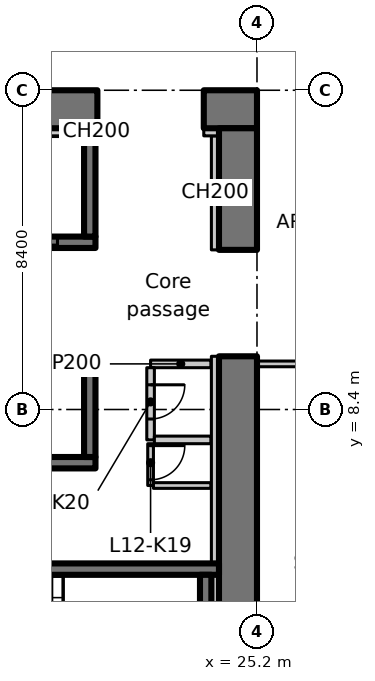
"""IFC4 building model, lengths in metres.
Left out: names, types, materials, properties, quantities, classifications, styles, units other than length and angle.
Written with IfcOpenShell. Run it as: python <this file> out.ifc"""

import sys

from ifc_helpers import new_model, si_unit, direction, frame, frame_2d, origin, place, context, subcontext, project, spatial, rectangle, extrude, element, fill, save


model = new_model("IFC4")
c1 = context("Model", 3, precision=1e-05, world=origin(), true_north=direction((0.0, 1.0)))
c2 = subcontext(c1, "Body", "Model", "MODEL_VIEW")
j1 = project(units=[si_unit("LENGTHUNIT", "METRE"), si_unit("PLANEANGLEUNIT", "RADIAN")], contexts=[c1])
p1 = place(None, origin())
s1 = spatial("IfcSite", under=j1, at=p1, CompositionType="ELEMENT")
p2 = place(p1, origin())
s2 = spatial("IfcBuilding", under=s1, at=p2, CompositionType="ELEMENT")
p3 = place(p2, frame((0.0, 0.0, 58.1)))
s3 = spatial("IfcBuildingStorey", under=s2, at=p3, CompositionType="ELEMENT", Elevation=58.1)
p4 = place(p3, frame((-1.1, 16.3, 0.0), z_axis=(0.0, 0.0, 1.0), x_axis=(1.0, 0.0, 0.0)))
e1 = element("IfcWall", 1, at=p4, inside=s3, PredefinedType="SHEAR", context=c2, shape_type="SweptSolid", body=[
    extrude(rectangle(XDim=22.1, YDim=1.0, at=frame_2d((11.05, 0.0))), origin(), (0.0, 0.0, 1.0), 3.35),
])
p5 = place(p4, frame((3.15, 0.0, 0.0)))
e2 = element("IfcOpeningElement", 2, at=p5, cuts=e1, PredefinedType="OPENING", context=c2, shape_type="SweptSolid", body=[
    extrude(rectangle(XDim=1.1, YDim=2.3, at=frame_2d((0.55, 1.15))), frame((0.0, 0.51, 0.0), z_axis=(0.0, -1.0, 0.0), x_axis=(1.0, 0.0, 0.0)), (0.0, 0.0, 1.0), 1.02),
])
p6 = place(p3, frame((23.8, 16.3, 0.0), z_axis=(0.0, 0.0, 1.0), x_axis=(1.0, 0.0, 0.0)))
e3 = element("IfcWall", 3, at=p6, inside=s3, PredefinedType="SHEAR", context=c2, shape_type="SweptSolid", body=[
    extrude(rectangle(XDim=1.4, YDim=1.0, at=frame_2d((0.7, 0.0))), origin(), (0.0, 0.0, 1.0), 3.35),
])
p7 = place(p3, frame((24.7, 1.0, 0.0), z_axis=(0.0, 0.0, 1.0), x_axis=(0.0, 1.0, 0.0)))
e4 = element("IfcWall", 4, at=p7, inside=s3, PredefinedType="SHEAR", context=c2, shape_type="SweptSolid", body=[
    extrude(rectangle(XDim=8.8, YDim=1.0, at=frame_2d((4.4, 0.0))), origin(), (0.0, 0.0, 1.0), 3.35),
])
p8 = place(p3, frame((24.7, 12.6, 0.0), z_axis=(0.0, 0.0, 1.0), x_axis=(0.0, 1.0, 0.0)))
e5 = element("IfcWall", 5, at=p8, inside=s3, PredefinedType="SHEAR", context=c2, shape_type="SweptSolid", body=[
    extrude(rectangle(XDim=3.2, YDim=1.0, at=frame_2d((1.6, 0.0))), origin(), (0.0, 0.0, 1.0), 3.35),
])
p9 = place(p3, frame((24.1, 12.6, 0.0), z_axis=(0.0, 0.0, 1.0), x_axis=(0.0, 1.0, 0.0)))
e6 = element("IfcWall", 6, at=p9, inside=s3, PredefinedType="PARTITIONING", context=c2, shape_type="SweptSolid", body=[
    extrude(rectangle(XDim=3.0, YDim=0.2, at=frame_2d((1.5, 0.0))), origin(), (0.0, 0.0, 1.0), 3.35),
])
p10 = place(p3, frame((23.8, 15.7, 0.0), z_axis=(0.0, 0.0, 1.0), x_axis=(1.0, 0.0, 0.0)))
e7 = element("IfcWall", 7, at=p10, inside=s3, PredefinedType="PARTITIONING", context=c2, shape_type="SweptSolid", body=[
    extrude(rectangle(XDim=0.4, YDim=0.2, at=frame_2d((0.2, 0.0))), origin(), (0.0, 0.0, 1.0), 3.35),
])
p11 = place(p3, frame((1.0, 7.0, 0.0), z_axis=(0.0, 0.0, 1.0), x_axis=(1.0, 0.0, 0.0)))
e8 = element("IfcWall", 8, at=p11, inside=s3, PredefinedType="SHEAR", context=c2, shape_type="SweptSolid", body=[
    extrude(rectangle(XDim=19.95, YDim=0.3, at=frame_2d((9.975, 0.0))), origin(), (0.0, 0.0, 1.0), 3.35),
])
p12 = place(p3, frame((1.0, 9.6, 0.0), z_axis=(0.0, 0.0, 1.0), x_axis=(1.0, 0.0, 0.0)))
e9 = element("IfcWall", 9, at=p12, inside=s3, PredefinedType="SHEAR", context=c2, shape_type="SweptSolid", body=[
    extrude(rectangle(XDim=19.95, YDim=0.3, at=frame_2d((9.975, 0.0))), origin(), (0.0, 0.0, 1.0), 3.35),
])
p13 = place(p12, frame((1.05, 0.0, 0.0)))
e10 = element("IfcOpeningElement", 10, at=p13, cuts=e9, PredefinedType="OPENING", context=c2, shape_type="SweptSolid", body=[
    extrude(rectangle(XDim=1.1, YDim=2.3, at=frame_2d((0.55, 1.15))), frame((0.0, 0.16, 0.0), z_axis=(0.0, -1.0, 0.0), x_axis=(1.0, 0.0, 0.0)), (0.0, 0.0, 1.0), 0.32),
])
p14 = place(p12, frame((3.85, 0.0, 0.0)))
e11 = element("IfcOpeningElement", 11, at=p14, cuts=e9, PredefinedType="OPENING", context=c2, shape_type="SweptSolid", body=[
    extrude(rectangle(XDim=1.1, YDim=2.3, at=frame_2d((0.55, 1.15))), frame((0.0, 0.16, 0.0), z_axis=(0.0, -1.0, 0.0), x_axis=(1.0, 0.0, 0.0)), (0.0, 0.0, 1.0), 0.32),
])
p15 = place(p12, frame((6.65, 0.0, 0.0)))
e12 = element("IfcOpeningElement", 12, at=p15, cuts=e9, PredefinedType="OPENING", context=c2, shape_type="SweptSolid", body=[
    extrude(rectangle(XDim=1.1, YDim=2.3, at=frame_2d((0.55, 1.15))), frame((0.0, 0.16, 0.0), z_axis=(0.0, -1.0, 0.0), x_axis=(1.0, 0.0, 0.0)), (0.0, 0.0, 1.0), 0.32),
])
p16 = place(p12, frame((9.45, 0.0, 0.0)))
e13 = element("IfcOpeningElement", 13, at=p16, cuts=e9, PredefinedType="OPENING", context=c2, shape_type="SweptSolid", body=[
    extrude(rectangle(XDim=1.1, YDim=2.3, at=frame_2d((0.55, 1.15))), frame((0.0, 0.16, 0.0), z_axis=(0.0, -1.0, 0.0), x_axis=(1.0, 0.0, 0.0)), (0.0, 0.0, 1.0), 0.32),
])
p17 = place(p12, frame((12.25, 0.0, 0.0)))
e14 = element("IfcOpeningElement", 14, at=p17, cuts=e9, PredefinedType="OPENING", context=c2, shape_type="SweptSolid", body=[
    extrude(rectangle(XDim=1.1, YDim=2.3, at=frame_2d((0.55, 1.15))), frame((0.0, 0.16, 0.0), z_axis=(0.0, -1.0, 0.0), x_axis=(1.0, 0.0, 0.0)), (0.0, 0.0, 1.0), 0.32),
])
p18 = place(p12, frame((15.05, 0.0, 0.0)))
e15 = element("IfcOpeningElement", 15, at=p18, cuts=e9, PredefinedType="OPENING", context=c2, shape_type="SweptSolid", body=[
    extrude(rectangle(XDim=1.1, YDim=2.3, at=frame_2d((0.55, 1.15))), frame((0.0, 0.16, 0.0), z_axis=(0.0, -1.0, 0.0), x_axis=(1.0, 0.0, 0.0)), (0.0, 0.0, 1.0), 0.32),
])
p19 = place(p3, frame((20.8, 7.15, 0.0), z_axis=(0.0, 0.0, 1.0), x_axis=(0.0, 1.0, 0.0)))
e16 = element("IfcWall", 16, at=p19, inside=s3, PredefinedType="SHEAR", context=c2, shape_type="SweptSolid", body=[
    extrude(rectangle(XDim=2.3, YDim=0.3, at=frame_2d((1.15, 0.0))), origin(), (0.0, 0.0, 1.0), 3.35),
])
p20 = place(p3, frame((15.05, 12.8, 0.0), z_axis=(0.0, 0.0, 1.0), x_axis=(1.0, 0.0, 0.0)))
e17 = element("IfcWall", 17, at=p20, inside=s3, PredefinedType="SHEAR", context=c2, shape_type="SweptSolid", body=[
    extrude(rectangle(XDim=5.9, YDim=0.3, at=frame_2d((2.95, 0.0))), origin(), (0.0, 0.0, 1.0), 3.35),
])
p21 = place(p20, frame((3.8, 0.0, 0.0)))
e18 = element("IfcOpeningElement", 18, at=p21, cuts=e17, PredefinedType="OPENING", context=c2, shape_type="SweptSolid", body=[
    extrude(rectangle(XDim=1.1, YDim=2.3, at=frame_2d((0.55, 1.15))), frame((0.0, 0.16, 0.0), z_axis=(0.0, -1.0, 0.0), x_axis=(1.0, 0.0, 0.0)), (0.0, 0.0, 1.0), 0.32),
])
p22 = place(p3, frame((20.8, 12.95, 0.0), z_axis=(0.0, 0.0, 1.0), x_axis=(0.0, 1.0, 0.0)))
e19 = element("IfcWall", 19, at=p22, inside=s3, PredefinedType="SHEAR", context=c2, shape_type="SweptSolid", body=[
    extrude(rectangle(XDim=2.85, YDim=0.3, at=frame_2d((1.425, 0.0))), origin(), (0.0, 0.0, 1.0), 3.35),
])
p23 = place(p3, frame((15.8, 4.2, 0.0), z_axis=(0.0, 0.0, 1.0), x_axis=(1.0, 0.0, 0.0)))
e20 = element("IfcWall", 20, at=p23, inside=s3, PredefinedType="SHEAR", context=c2, shape_type="SweptSolid", body=[
    extrude(rectangle(XDim=8.4, YDim=0.3, at=frame_2d((4.2, 0.0))), origin(), (0.0, 0.0, 1.0), 3.35),
])
p24 = place(p23, frame((0.4, 0.0, 0.0)))
e21 = element("IfcOpeningElement", 21, at=p24, cuts=e20, PredefinedType="OPENING", context=c2, shape_type="SweptSolid", body=[
    extrude(rectangle(XDim=1.0, YDim=2.1, at=frame_2d((0.5, 1.05))), frame((0.0, 0.16, 0.0), z_axis=(0.0, -1.0, 0.0), x_axis=(1.0, 0.0, 0.0)), (0.0, 0.0, 1.0), 0.32),
])
p25 = place(p3, frame((23.85, 1.5, 0.0), z_axis=(0.0, 0.0, 1.0), x_axis=(0.0, 1.0, 0.0)))
e22 = element("IfcWall", 22, at=p25, inside=s3, PredefinedType="SHEAR", context=c2, shape_type="SweptSolid", body=[
    extrude(rectangle(XDim=2.55, YDim=0.3, at=frame_2d((1.275, 0.0))), origin(), (0.0, 0.0, 1.0), 3.35),
])
p26 = place(p3, frame((23.988, 9.6, 0.0), z_axis=(0.0, 0.0, 1.0), x_axis=(-1.0, 0.0, 0.0)))
e23 = element("IfcWall", 23, at=p26, inside=s3, PredefinedType="PARTITIONING", context=c2, shape_type="SweptSolid", body=[
    extrude(rectangle(XDim=1.588, YDim=0.2, at=frame_2d((0.794, 0.0))), origin(), (0.0, 0.0, 1.0), 3.35),
])
p27 = place(p3, frame((22.4, 9.5, 0.0), z_axis=(0.0, 0.0, 1.0), x_axis=(0.0, -1.0, 0.0)))
e24 = element("IfcWall", 24, at=p27, inside=s3, PredefinedType="PARTITIONING", context=c2, shape_type="SweptSolid", body=[
    extrude(rectangle(XDim=1.9, YDim=0.2, at=frame_2d((0.95, 0.0))), origin(), (0.0, 0.0, 1.0), 3.35),
])
p28 = place(p27, frame((0.45, 0.0, 0.0)))
e25 = element("IfcOpeningElement", 25, at=p28, cuts=e24, PredefinedType="OPENING", context=c2, shape_type="SweptSolid", body=[
    extrude(rectangle(XDim=0.9, YDim=2.1, at=frame_2d((0.45, 1.05))), frame((0.0, 0.11, 0.0), z_axis=(0.0, -1.0, 0.0), x_axis=(1.0, 0.0, 0.0)), (0.0, 0.0, 1.0), 0.22),
])
p29 = place(p3, frame((22.5, 7.6, 0.0), z_axis=(0.0, 0.0, 1.0), x_axis=(1.0, 0.0, 0.0)))
e26 = element("IfcWall", 26, at=p29, inside=s3, PredefinedType="PARTITIONING", context=c2, shape_type="SweptSolid", body=[
    extrude(rectangle(XDim=1.488, YDim=0.2, at=frame_2d((0.744, 0.0))), origin(), (0.0, 0.0, 1.0), 3.35),
])
p30 = place(p3, frame((22.4, 7.5, 0.0), z_axis=(0.0, 0.0, 1.0), x_axis=(0.0, -1.0, 0.0)))
e27 = element("IfcWall", 27, at=p30, inside=s3, PredefinedType="PARTITIONING", context=c2, shape_type="SweptSolid", body=[
    extrude(rectangle(XDim=1.1, YDim=0.15, at=frame_2d((0.55, 0.0))), origin(), (0.0, 0.0, 1.0), 3.35),
])
p31 = place(p30, frame((0.05, 0.0, 0.0)))
e28 = element("IfcOpeningElement", 28, at=p31, cuts=e27, PredefinedType="OPENING", context=c2, shape_type="SweptSolid", body=[
    extrude(rectangle(XDim=0.9, YDim=2.1, at=frame_2d((0.45, 1.05))), frame((0.0, 0.085, 0.0), z_axis=(0.0, -1.0, 0.0), x_axis=(1.0, 0.0, 0.0)), (0.0, 0.0, 1.0), 0.17),
])
p32 = place(p3, frame((22.475, 6.4, 0.0), z_axis=(0.0, 0.0, 1.0), x_axis=(1.0, 0.0, 0.0)))
e29 = element("IfcWall", 29, at=p32, inside=s3, PredefinedType="PARTITIONING", context=c2, shape_type="SweptSolid", body=[
    extrude(rectangle(XDim=1.513, YDim=0.15, at=frame_2d((0.756, 0.0))), origin(), (0.0, 0.0, 1.0), 3.35),
])
p33 = place(p3, frame((18.15, 15.7, 0.0), z_axis=(0.0, 0.0, 1.0), x_axis=(1.0, 0.0, 0.0)))
e30 = element("IfcWall", 30, at=p33, inside=s3, PredefinedType="PARTITIONING", context=c2, shape_type="SweptSolid", body=[
    extrude(rectangle(XDim=2.5, YDim=0.2, at=frame_2d((1.25, 0.0))), origin(), (0.0, 0.0, 1.0), 3.35),
])
p34 = place(p3, frame((20.95, 15.7, 0.0), z_axis=(0.0, 0.0, 1.0), x_axis=(1.0, 0.0, 0.0)))
e31 = element("IfcWall", 31, at=p34, inside=s3, PredefinedType="PARTITIONING", context=c2, shape_type="SweptSolid", body=[
    extrude(rectangle(XDim=0.05, YDim=0.2, at=frame_2d((0.025, 0.0))), origin(), (0.0, 0.0, 1.0), 3.35),
])
p35 = place(p3, frame((24.1, 1.5, 0.0), z_axis=(0.0, 0.0, 1.0), x_axis=(0.0, 1.0, 0.0)))
e32 = element("IfcWall", 32, at=p35, inside=s3, PredefinedType="PARTITIONING", context=c2, shape_type="SweptSolid", body=[
    extrude(rectangle(XDim=2.55, YDim=0.2, at=frame_2d((1.275, 0.0))), origin(), (0.0, 0.0, 1.0), 3.35),
])
p36 = place(p3, frame((24.1, 4.35, 0.0), z_axis=(0.0, 0.0, 1.0), x_axis=(0.0, 1.0, 0.0)))
e33 = element("IfcWall", 33, at=p36, inside=s3, PredefinedType="PARTITIONING", context=c2, shape_type="SweptSolid", body=[
    extrude(rectangle(XDim=5.45, YDim=0.2, at=frame_2d((2.725, 0.0))), origin(), (0.0, 0.0, 1.0), 3.35),
])
p37 = place(p3, frame((29.4, 9.6, 0.0), z_axis=(0.0, 0.0, 1.0), x_axis=(-1.0, 0.0, 0.0)))
e34 = element("IfcWall", 34, at=p37, inside=s3, PredefinedType="PARTITIONING", context=c2, shape_type="SweptSolid", body=[
    extrude(rectangle(XDim=4.2, YDim=0.15, at=frame_2d((2.1, 0.0))), origin(), (0.0, 0.0, 1.0), 3.33),
])
p38 = place(p37, frame((1.5, 0.0, 0.0)))
e35 = element("IfcOpeningElement", 35, at=p38, cuts=e34, PredefinedType="OPENING", context=c2, shape_type="SweptSolid", body=[
    extrude(rectangle(XDim=1.1, YDim=2.1, at=frame_2d((0.55, 1.05))), frame((0.0, 0.085, 0.0), z_axis=(0.0, -1.0, 0.0), x_axis=(1.0, 0.0, 0.0)), (0.0, 0.0, 1.0), 0.17),
])
p39 = place(p21, origin())
e36 = element("IfcDoor", 36, at=p39, inside=s3, OperationType="SLIDING_TO_LEFT", PredefinedType="DOOR", context=c2, shape_type="SweptSolid", body=[
    extrude(rectangle(XDim=1.1, YDim=2.3, at=frame_2d((0.55, 1.15))), frame((0.0, 0.025, 0.0), z_axis=(0.0, -1.0, 0.0), x_axis=(1.0, 0.0, 0.0)), (0.0, 0.0, 1.0), 0.05),
])
fill(e18, e36)
p40 = place(p31, origin())
e37 = element("IfcDoor", 37, at=p40, inside=s3, OperationType="SINGLE_SWING_RIGHT", PredefinedType="DOOR", context=c2, shape_type="SweptSolid", body=[
    extrude(rectangle(XDim=0.9, YDim=2.1, at=frame_2d((0.45, 1.05))), frame((0.0, 0.025, 0.0), z_axis=(0.0, -1.0, 0.0), x_axis=(1.0, 0.0, 0.0)), (0.0, 0.0, 1.0), 0.05),
])
fill(e28, e37)
p41 = place(p28, origin())
e38 = element("IfcDoor", 38, at=p41, inside=s3, OperationType="SINGLE_SWING_LEFT", PredefinedType="DOOR", context=c2, shape_type="SweptSolid", body=[
    extrude(rectangle(XDim=0.9, YDim=2.1, at=frame_2d((0.45, 1.05))), frame((0.0, 0.025, 0.0), z_axis=(0.0, -1.0, 0.0), x_axis=(1.0, 0.0, 0.0)), (0.0, 0.0, 1.0), 0.05),
])
fill(e25, e38)
save(model, sys.argv[1])
